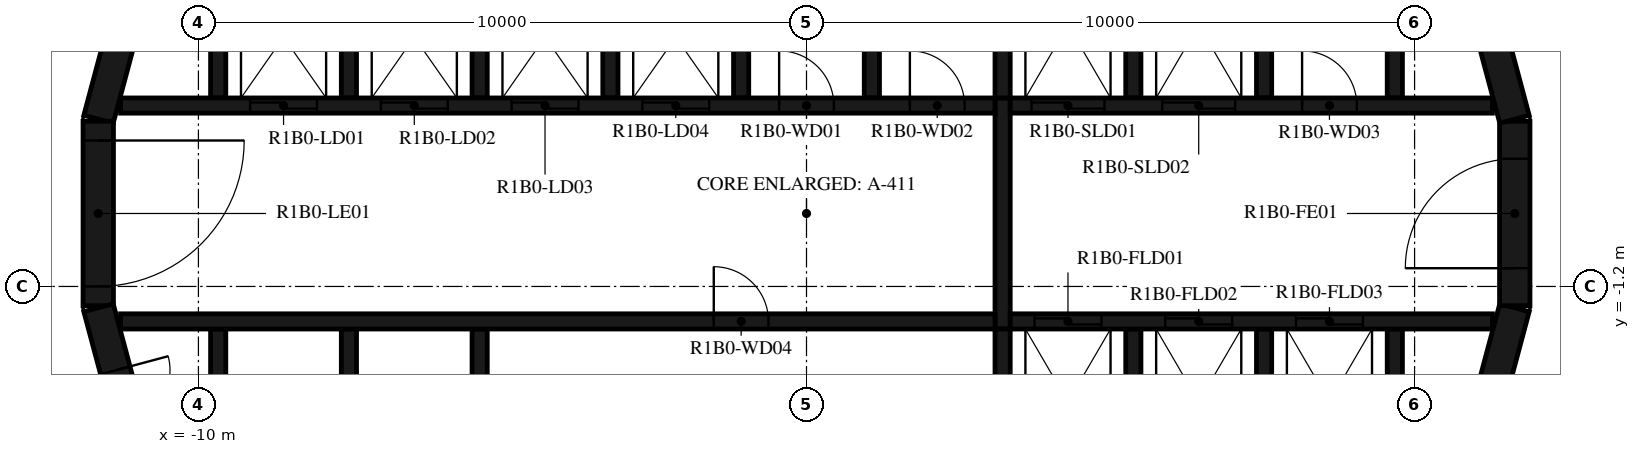
"""IFC4 building model, lengths in metres.
Left out: names, types, materials, properties, quantities, classifications, styles, units other than length and angle.
Written with IfcOpenShell. Run it as: python <this file> out.ifc"""

import sys

from ifc_helpers import new_model, si_unit, direction, frame, frame_2d, origin, place, context, subcontext, project, spatial, polyline, rectangle, outline, extrude, element, fill, save


model = new_model("IFC4")
c1 = context("Model", 3, precision=1e-05, world=origin(), true_north=direction((0.0, 1.0)))
c2 = subcontext(c1, "Body", "Model", "MODEL_VIEW")
j1 = project(units=[si_unit("LENGTHUNIT", "METRE"), si_unit("PLANEANGLEUNIT", "RADIAN")], contexts=[c1])
p1 = place(None, origin())
s1 = spatial("IfcSite", under=j1, at=p1, CompositionType="ELEMENT")
p2 = place(p1, origin())
s2 = spatial("IfcBuilding", under=s1, at=p2, CompositionType="ELEMENT")
p3 = place(p2, frame((0.0, 0.0, 52.4)))
s3 = spatial("IfcBuildingStorey", under=s2, at=p3, CompositionType="ELEMENT", Elevation=52.4)
p4 = place(p3, frame((10.858, -4.479, 0.0), z_axis=(0.0, 0.0, 1.0), x_axis=(0.258734743916, 0.965948410781, 0.0)))
e1 = element("IfcWall", 1, at=p4, inside=s3, PredefinedType="SHEAR", context=c2, shape_type="SweptSolid", body=[
    extrude(rectangle(XDim=3.033, YDim=0.5, at=frame_2d((1.516, 0.0))), origin(), (0.0, 0.0, 1.0), 3.12),
])
p5 = place(p3, frame((11.647, -1.516, 0.0), z_axis=(0.0, 0.0, 1.0), x_axis=(0.0, 1.0, 0.0)))
e2 = element("IfcWall", 2, at=p5, inside=s3, PredefinedType="SHEAR", context=c2, shape_type="SweptSolid", body=[
    extrude(rectangle(XDim=3.033, YDim=0.5, at=frame_2d((1.516, 0.0))), origin(), (0.0, 0.0, 1.0), 3.12),
])
p6 = place(p5, frame((0.616, 0.0, 0.0)))
e3 = element("IfcOpeningElement", 3, at=p6, cuts=e2, PredefinedType="OPENING", context=c2, shape_type="SweptSolid", body=[
    extrude(rectangle(XDim=1.8, YDim=2.1, at=frame_2d((0.9, 1.05))), frame((0.0, 0.26, 0.0), z_axis=(0.0, -1.0, 0.0), x_axis=(1.0, 0.0, 0.0)), (0.0, 0.0, 1.0), 0.52),
])
for number, where, z_axis, x_axis in (
    (4, (11.643, 1.55, 0.0), (0.0, 0.0, 1.0), (-0.259, 0.966, 0.0)),
    (5, (-10.858, 4.479, 0.0), (0.0, 0.0, 1.0), (-0.259, -0.966, 0.0)),
):
    element("IfcWall", number, at=place(p3, frame(where, z_axis=z_axis, x_axis=x_axis)), inside=s3, PredefinedType="SHEAR", context=c2, shape_type="SweptSolid", body=[
        extrude(rectangle(XDim=3.033, YDim=0.5, at=frame_2d((1.516, 0.0))), origin(), (0.0, 0.0, 1.0), 3.12),
    ])
p7 = place(p3, frame((-11.647, 1.516, 0.0), z_axis=(0.0, 0.0, 1.0), x_axis=(0.0, -1.0, 0.0)))
e6 = element("IfcWall", 6, at=p7, inside=s3, PredefinedType="SHEAR", context=c2, shape_type="SweptSolid", body=[
    extrude(rectangle(XDim=3.033, YDim=0.5, at=frame_2d((1.516, 0.0))), origin(), (0.0, 0.0, 1.0), 3.12),
])
p8 = place(p7, frame((0.316, 0.0, 0.0)))
e7 = element("IfcOpeningElement", 7, at=p8, cuts=e6, PredefinedType="OPENING", context=c2, shape_type="SweptSolid", body=[
    extrude(rectangle(XDim=2.4, YDim=2.1, at=frame_2d((1.2, 1.05))), frame((0.0, 0.26, 0.0), z_axis=(0.0, -1.0, 0.0), x_axis=(1.0, 0.0, 0.0)), (0.0, 0.0, 1.0), 0.52),
])
p9 = place(p3, frame((-11.643, -1.55, 0.0), z_axis=(0.0, 0.0, 1.0), x_axis=(0.258734743916, -0.965948410781, 0.0)))
e8 = element("IfcWall", 8, at=p9, inside=s3, PredefinedType="SHEAR", context=c2, shape_type="SweptSolid", body=[
    extrude(rectangle(XDim=3.033, YDim=0.5, at=frame_2d((1.516, 0.0))), origin(), (0.0, 0.0, 1.0), 3.12),
])
p10 = place(p9, frame((1.066, 0.0, 0.0)))
e9 = element("IfcOpeningElement", 9, at=p10, cuts=e8, PredefinedType="OPENING", context=c2, shape_type="SweptSolid", body=[
    extrude(rectangle(XDim=0.9, YDim=2.1, at=frame_2d((0.45, 1.05))), frame((0.0, 0.26, 0.0), z_axis=(0.0, -1.0, 0.0), x_axis=(1.0, 0.0, 0.0)), (0.0, 0.0, 1.0), 0.52),
])
p11 = place(p3, origin())
e10 = element("IfcWall", 10, at=p11, inside=s3, PredefinedType="SHEAR", context=c2, shape_type="SweptSolid", body=[
    extrude(outline(polyline([(-9.55, 4.8), (-7.65, 4.8), (-7.65, 1.9), (-7.4, 1.9), (-7.4, 4.8), (-5.5, 4.8), (-5.5, 1.9), (-5.25, 1.9), (-5.25, 4.8), (-3.35, 4.8), (-3.35, 1.9), (-3.1, 1.9), (-3.1, 4.8), (-1.2, 4.8), (-1.2, 1.9), (-0.95, 1.9), (-0.95, 4.8), (0.95, 4.8), (0.95, 1.9), (1.2, 1.9), (1.2, 4.8), (3.1, 4.8), (3.1, 1.9), (3.35, 1.9), (3.35, 4.8), (5.25, 4.8), (5.25, 1.9), (5.5, 1.9), (5.5, 4.8), (7.4, 4.8), (7.4, 1.9), (7.65, 1.9), (7.65, 4.8), (9.55, 4.8), (9.55, 1.9), (9.8, 1.9), (9.8, 4.8), (9.8, 5.05), (-9.8, 5.05), (-9.8, 4.8), (-9.8, 1.9), (-9.55, 1.9), (-9.55, 4.8)])), origin(), (0.0, 0.0, 1.0), 3.12),
])
p12 = place(p3, origin())
e11 = element("IfcWall", 11, at=p12, inside=s3, PredefinedType="SHEAR", context=c2, shape_type="SweptSolid", body=[
    extrude(outline(polyline([(9.8, -5.05), (9.8, -4.8), (9.8, -1.9), (9.55, -1.9), (9.55, -4.8), (7.65, -4.8), (7.65, -1.9), (7.4, -1.9), (7.4, -4.8), (5.5, -4.8), (5.5, -1.9), (5.25, -1.9), (5.25, -4.8), (3.35, -4.8), (3.35, -1.9), (3.1, -1.9), (3.1, -4.8), (-5.25, -4.8), (-5.25, -1.9), (-5.5, -1.9), (-5.5, -4.8), (-7.4, -4.8), (-7.4, -1.9), (-7.65, -1.9), (-7.65, -4.8), (-9.55, -4.8), (-9.55, -1.9), (-9.8, -1.9), (-9.8, -4.8), (-9.8, -5.05), (9.8, -5.05)])), origin(), (0.0, 0.0, 1.0), 3.12),
])
p13 = place(p3, frame((-11.28, 1.775, 0.0), z_axis=(0.0, 0.0, 1.0), x_axis=(1.0, 0.0, 0.0)))
e12 = element("IfcWall", 12, at=p13, inside=s3, PredefinedType="SHEAR", context=c2, shape_type="SweptSolid", body=[
    extrude(rectangle(XDim=14.38, YDim=0.25, at=frame_2d((7.19, 0.0))), origin(), (0.0, 0.0, 1.0), 3.12),
])
p14 = place(p13, frame((2.13, 0.0, 0.0)))
e13 = element("IfcOpeningElement", 13, at=p14, cuts=e12, PredefinedType="OPENING", context=c2, shape_type="SweptSolid", body=[
    extrude(rectangle(XDim=1.1, YDim=2.1, at=frame_2d((0.55, 1.05))), frame((0.0, 0.135, 0.0), z_axis=(0.0, -1.0, 0.0), x_axis=(1.0, 0.0, 0.0)), (0.0, 0.0, 1.0), 0.27),
])
p15 = place(p13, frame((4.28, 0.0, 0.0)))
e14 = element("IfcOpeningElement", 14, at=p15, cuts=e12, PredefinedType="OPENING", context=c2, shape_type="SweptSolid", body=[
    extrude(rectangle(XDim=1.1, YDim=2.1, at=frame_2d((0.55, 1.05))), frame((0.0, 0.135, 0.0), z_axis=(0.0, -1.0, 0.0), x_axis=(1.0, 0.0, 0.0)), (0.0, 0.0, 1.0), 0.27),
])
p16 = place(p13, frame((6.43, 0.0, 0.0)))
e15 = element("IfcOpeningElement", 15, at=p16, cuts=e12, PredefinedType="OPENING", context=c2, shape_type="SweptSolid", body=[
    extrude(rectangle(XDim=1.1, YDim=2.1, at=frame_2d((0.55, 1.05))), frame((0.0, 0.135, 0.0), z_axis=(0.0, -1.0, 0.0), x_axis=(1.0, 0.0, 0.0)), (0.0, 0.0, 1.0), 0.27),
])
p17 = place(p13, frame((8.58, 0.0, 0.0)))
e16 = element("IfcOpeningElement", 16, at=p17, cuts=e12, PredefinedType="OPENING", context=c2, shape_type="SweptSolid", body=[
    extrude(rectangle(XDim=1.1, YDim=2.1, at=frame_2d((0.55, 1.05))), frame((0.0, 0.135, 0.0), z_axis=(0.0, -1.0, 0.0), x_axis=(1.0, 0.0, 0.0)), (0.0, 0.0, 1.0), 0.27),
])
p18 = place(p13, frame((10.83, 0.0, 0.0)))
e17 = element("IfcOpeningElement", 17, at=p18, cuts=e12, PredefinedType="OPENING", context=c2, shape_type="SweptSolid", body=[
    extrude(rectangle(XDim=0.9, YDim=2.1, at=frame_2d((0.45, 1.05))), frame((0.0, 0.135, 0.0), z_axis=(0.0, -1.0, 0.0), x_axis=(1.0, 0.0, 0.0)), (0.0, 0.0, 1.0), 0.27),
])
p19 = place(p13, frame((12.98, 0.0, 0.0)))
e18 = element("IfcOpeningElement", 18, at=p19, cuts=e12, PredefinedType="OPENING", context=c2, shape_type="SweptSolid", body=[
    extrude(rectangle(XDim=0.9, YDim=2.1, at=frame_2d((0.45, 1.05))), frame((0.0, 0.135, 0.0), z_axis=(0.0, -1.0, 0.0), x_axis=(1.0, 0.0, 0.0)), (0.0, 0.0, 1.0), 0.27),
])
p20 = place(p3, frame((3.35, 1.775, 0.0), z_axis=(0.0, 0.0, 1.0), x_axis=(1.0, 0.0, 0.0)))
e19 = element("IfcWall", 19, at=p20, inside=s3, PredefinedType="SHEAR", context=c2, shape_type="SweptSolid", body=[
    extrude(rectangle(XDim=7.93, YDim=0.25, at=frame_2d((3.965, 0.0))), origin(), (0.0, 0.0, 1.0), 3.12),
])
p21 = place(p20, frame((0.35, 0.0, 0.0)))
e20 = element("IfcOpeningElement", 20, at=p21, cuts=e19, PredefinedType="OPENING", context=c2, shape_type="SweptSolid", body=[
    extrude(rectangle(XDim=1.2, YDim=2.4, at=frame_2d((0.6, 1.2))), frame((0.0, 0.135, 0.0), z_axis=(0.0, -1.0, 0.0), x_axis=(1.0, 0.0, 0.0)), (0.0, 0.0, 1.0), 0.27),
])
p22 = place(p20, frame((2.5, 0.0, 0.0)))
e21 = element("IfcOpeningElement", 21, at=p22, cuts=e19, PredefinedType="OPENING", context=c2, shape_type="SweptSolid", body=[
    extrude(rectangle(XDim=1.2, YDim=2.4, at=frame_2d((0.6, 1.2))), frame((0.0, 0.135, 0.0), z_axis=(0.0, -1.0, 0.0), x_axis=(1.0, 0.0, 0.0)), (0.0, 0.0, 1.0), 0.27),
])
p23 = place(p20, frame((4.8, 0.0, 0.0)))
e22 = element("IfcOpeningElement", 22, at=p23, cuts=e19, PredefinedType="OPENING", context=c2, shape_type="SweptSolid", body=[
    extrude(rectangle(XDim=0.9, YDim=2.1, at=frame_2d((0.45, 1.05))), frame((0.0, 0.135, 0.0), z_axis=(0.0, -1.0, 0.0), x_axis=(1.0, 0.0, 0.0)), (0.0, 0.0, 1.0), 0.27),
])
p24 = place(p3, frame((-11.28, -1.775, 0.0), z_axis=(0.0, 0.0, 1.0), x_axis=(1.0, 0.0, 0.0)))
e23 = element("IfcWall", 23, at=p24, inside=s3, PredefinedType="SHEAR", context=c2, shape_type="SweptSolid", body=[
    extrude(rectangle(XDim=14.38, YDim=0.25, at=frame_2d((7.19, 0.0))), origin(), (0.0, 0.0, 1.0), 3.12),
])
p25 = place(p24, frame((9.755, 0.0, 0.0)))
e24 = element("IfcOpeningElement", 24, at=p25, cuts=e23, PredefinedType="OPENING", context=c2, shape_type="SweptSolid", body=[
    extrude(rectangle(XDim=0.9, YDim=2.1, at=frame_2d((0.45, 1.05))), frame((0.0, 0.135, 0.0), z_axis=(0.0, -1.0, 0.0), x_axis=(1.0, 0.0, 0.0)), (0.0, 0.0, 1.0), 0.27),
])
p26 = place(p3, frame((3.35, -1.775, 0.0), z_axis=(0.0, 0.0, 1.0), x_axis=(1.0, 0.0, 0.0)))
e25 = element("IfcWall", 25, at=p26, inside=s3, PredefinedType="SHEAR", context=c2, shape_type="SweptSolid", body=[
    extrude(rectangle(XDim=7.93, YDim=0.25, at=frame_2d((3.965, 0.0))), origin(), (0.0, 0.0, 1.0), 3.12),
])
p27 = place(p26, frame((0.4, 0.0, 0.0)))
e26 = element("IfcOpeningElement", 26, at=p27, cuts=e25, PredefinedType="OPENING", context=c2, shape_type="SweptSolid", body=[
    extrude(rectangle(XDim=1.1, YDim=2.4, at=frame_2d((0.55, 1.2))), frame((0.0, 0.135, 0.0), z_axis=(0.0, -1.0, 0.0), x_axis=(1.0, 0.0, 0.0)), (0.0, 0.0, 1.0), 0.27),
])
p28 = place(p26, frame((2.55, 0.0, 0.0)))
e27 = element("IfcOpeningElement", 27, at=p28, cuts=e25, PredefinedType="OPENING", context=c2, shape_type="SweptSolid", body=[
    extrude(rectangle(XDim=1.1, YDim=2.4, at=frame_2d((0.55, 1.2))), frame((0.0, 0.135, 0.0), z_axis=(0.0, -1.0, 0.0), x_axis=(1.0, 0.0, 0.0)), (0.0, 0.0, 1.0), 0.27),
])
p29 = place(p26, frame((4.7, 0.0, 0.0)))
e28 = element("IfcOpeningElement", 28, at=p29, cuts=e25, PredefinedType="OPENING", context=c2, shape_type="SweptSolid", body=[
    extrude(rectangle(XDim=1.1, YDim=2.4, at=frame_2d((0.55, 1.2))), frame((0.0, 0.135, 0.0), z_axis=(0.0, -1.0, 0.0), x_axis=(1.0, 0.0, 0.0)), (0.0, 0.0, 1.0), 0.27),
])
p30 = place(p3, frame((3.225, -1.9, 0.0), z_axis=(0.0, 0.0, 1.0), x_axis=(0.0, 1.0, 0.0)))
e29 = element("IfcWall", 29, at=p30, inside=s3, PredefinedType="SHEAR", context=c2, shape_type="SweptSolid", body=[
    extrude(rectangle(XDim=3.8, YDim=0.25, at=frame_2d((1.9, 0.0))), origin(), (0.0, 0.0, 1.0), 3.12),
])
p31 = place(p8, origin())
e30 = element("IfcDoor", 30, at=p31, inside=s3, OperationType="DOUBLE_DOOR_SINGLE_SWING", PredefinedType="DOOR", context=c2, shape_type="SweptSolid", body=[
    extrude(rectangle(XDim=2.4, YDim=2.1, at=frame_2d((1.2, 1.05))), frame((0.0, 0.025, 0.0), z_axis=(0.0, -1.0, 0.0), x_axis=(1.0, 0.0, 0.0)), (0.0, 0.0, 1.0), 0.05),
])
fill(e7, e30)
p32 = place(p6, origin())
e31 = element("IfcDoor", 31, at=p32, inside=s3, OperationType="DOUBLE_DOOR_SINGLE_SWING", PredefinedType="DOOR", context=c2, shape_type="SweptSolid", body=[
    extrude(rectangle(XDim=1.8, YDim=2.1, at=frame_2d((0.9, 1.05))), frame((0.0, 0.025, 0.0), z_axis=(0.0, -1.0, 0.0), x_axis=(1.0, 0.0, 0.0)), (0.0, 0.0, 1.0), 0.05),
])
fill(e3, e31)
p33 = place(p14, origin())
e32 = element("IfcDoor", 32, at=p33, inside=s3, OperationType="DOUBLE_DOOR_SLIDING", PredefinedType="DOOR", context=c2, shape_type="SweptSolid", body=[
    extrude(rectangle(XDim=1.1, YDim=2.1, at=frame_2d((0.55, 1.05))), frame((0.0, 0.025, 0.0), z_axis=(0.0, -1.0, 0.0), x_axis=(1.0, 0.0, 0.0)), (0.0, 0.0, 1.0), 0.05),
])
fill(e13, e32)
p34 = place(p15, origin())
e33 = element("IfcDoor", 33, at=p34, inside=s3, OperationType="DOUBLE_DOOR_SLIDING", PredefinedType="DOOR", context=c2, shape_type="SweptSolid", body=[
    extrude(rectangle(XDim=1.1, YDim=2.1, at=frame_2d((0.55, 1.05))), frame((0.0, 0.025, 0.0), z_axis=(0.0, -1.0, 0.0), x_axis=(1.0, 0.0, 0.0)), (0.0, 0.0, 1.0), 0.05),
])
fill(e14, e33)
p35 = place(p16, origin())
e34 = element("IfcDoor", 34, at=p35, inside=s3, OperationType="DOUBLE_DOOR_SLIDING", PredefinedType="DOOR", context=c2, shape_type="SweptSolid", body=[
    extrude(rectangle(XDim=1.1, YDim=2.1, at=frame_2d((0.55, 1.05))), frame((0.0, 0.025, 0.0), z_axis=(0.0, -1.0, 0.0), x_axis=(1.0, 0.0, 0.0)), (0.0, 0.0, 1.0), 0.05),
])
fill(e15, e34)
p36 = place(p17, origin())
e35 = element("IfcDoor", 35, at=p36, inside=s3, OperationType="DOUBLE_DOOR_SLIDING", PredefinedType="DOOR", context=c2, shape_type="SweptSolid", body=[
    extrude(rectangle(XDim=1.1, YDim=2.1, at=frame_2d((0.55, 1.05))), frame((0.0, 0.025, 0.0), z_axis=(0.0, -1.0, 0.0), x_axis=(1.0, 0.0, 0.0)), (0.0, 0.0, 1.0), 0.05),
])
fill(e16, e35)
p37 = place(p21, origin())
e36 = element("IfcDoor", 36, at=p37, inside=s3, OperationType="DOUBLE_DOOR_SLIDING", PredefinedType="DOOR", context=c2, shape_type="SweptSolid", body=[
    extrude(rectangle(XDim=1.2, YDim=2.4, at=frame_2d((0.6, 1.2))), frame((0.0, 0.025, 0.0), z_axis=(0.0, -1.0, 0.0), x_axis=(1.0, 0.0, 0.0)), (0.0, 0.0, 1.0), 0.05),
])
fill(e20, e36)
p38 = place(p22, origin())
e37 = element("IfcDoor", 37, at=p38, inside=s3, OperationType="DOUBLE_DOOR_SLIDING", PredefinedType="DOOR", context=c2, shape_type="SweptSolid", body=[
    extrude(rectangle(XDim=1.2, YDim=2.4, at=frame_2d((0.6, 1.2))), frame((0.0, 0.025, 0.0), z_axis=(0.0, -1.0, 0.0), x_axis=(1.0, 0.0, 0.0)), (0.0, 0.0, 1.0), 0.05),
])
fill(e21, e37)
p39 = place(p27, origin())
e38 = element("IfcDoor", 38, at=p39, inside=s3, OperationType="DOUBLE_DOOR_SLIDING", PredefinedType="DOOR", context=c2, shape_type="SweptSolid", body=[
    extrude(rectangle(XDim=1.1, YDim=2.4, at=frame_2d((0.55, 1.2))), frame((0.0, 0.025, 0.0), z_axis=(0.0, -1.0, 0.0), x_axis=(1.0, 0.0, 0.0)), (0.0, 0.0, 1.0), 0.05),
])
fill(e26, e38)
p40 = place(p28, origin())
e39 = element("IfcDoor", 39, at=p40, inside=s3, OperationType="DOUBLE_DOOR_SLIDING", PredefinedType="DOOR", context=c2, shape_type="SweptSolid", body=[
    extrude(rectangle(XDim=1.1, YDim=2.4, at=frame_2d((0.55, 1.2))), frame((0.0, 0.025, 0.0), z_axis=(0.0, -1.0, 0.0), x_axis=(1.0, 0.0, 0.0)), (0.0, 0.0, 1.0), 0.05),
])
fill(e27, e39)
p41 = place(p29, origin())
e40 = element("IfcDoor", 40, at=p41, inside=s3, OperationType="DOUBLE_DOOR_SLIDING", PredefinedType="DOOR", context=c2, shape_type="SweptSolid", body=[
    extrude(rectangle(XDim=1.1, YDim=2.4, at=frame_2d((0.55, 1.2))), frame((0.0, 0.025, 0.0), z_axis=(0.0, -1.0, 0.0), x_axis=(1.0, 0.0, 0.0)), (0.0, 0.0, 1.0), 0.05),
])
fill(e28, e40)
p42 = place(p18, origin())
e41 = element("IfcDoor", 41, at=p42, inside=s3, OperationType="SINGLE_SWING_RIGHT", PredefinedType="DOOR", context=c2, shape_type="SweptSolid", body=[
    extrude(rectangle(XDim=0.9, YDim=2.1, at=frame_2d((0.45, 1.05))), frame((0.0, 0.025, 0.0), z_axis=(0.0, -1.0, 0.0), x_axis=(1.0, 0.0, 0.0)), (0.0, 0.0, 1.0), 0.05),
])
fill(e17, e41)
p43 = place(p19, origin())
e42 = element("IfcDoor", 42, at=p43, inside=s3, OperationType="SINGLE_SWING_LEFT", PredefinedType="DOOR", context=c2, shape_type="SweptSolid", body=[
    extrude(rectangle(XDim=0.9, YDim=2.1, at=frame_2d((0.45, 1.05))), frame((0.0, 0.025, 0.0), z_axis=(0.0, -1.0, 0.0), x_axis=(1.0, 0.0, 0.0)), (0.0, 0.0, 1.0), 0.05),
])
fill(e18, e42)
p44 = place(p23, origin())
e43 = element("IfcDoor", 43, at=p44, inside=s3, OperationType="SINGLE_SWING_RIGHT", PredefinedType="DOOR", context=c2, shape_type="SweptSolid", body=[
    extrude(rectangle(XDim=0.9, YDim=2.1, at=frame_2d((0.45, 1.05))), frame((0.0, 0.025, 0.0), z_axis=(0.0, -1.0, 0.0), x_axis=(1.0, 0.0, 0.0)), (0.0, 0.0, 1.0), 0.05),
])
fill(e22, e43)
p45 = place(p25, origin())
e44 = element("IfcDoor", 44, at=p45, inside=s3, OperationType="SINGLE_SWING_LEFT", PredefinedType="DOOR", context=c2, shape_type="SweptSolid", body=[
    extrude(rectangle(XDim=0.9, YDim=2.1, at=frame_2d((0.45, 1.05))), frame((0.0, 0.025, 0.0), z_axis=(0.0, -1.0, 0.0), x_axis=(1.0, 0.0, 0.0)), (0.0, 0.0, 1.0), 0.05),
])
fill(e24, e44)
p46 = place(p10, origin())
e45 = element("IfcDoor", 45, at=p46, inside=s3, OperationType="SINGLE_SWING_RIGHT", PredefinedType="DOOR", context=c2, shape_type="SweptSolid", body=[
    extrude(rectangle(XDim=0.9, YDim=2.1, at=frame_2d((0.45, 1.05))), frame((0.0, 0.025, 0.0), z_axis=(0.0, -1.0, 0.0), x_axis=(1.0, 0.0, 0.0)), (0.0, 0.0, 1.0), 0.05),
])
fill(e9, e45)
save(model, sys.argv[1])
